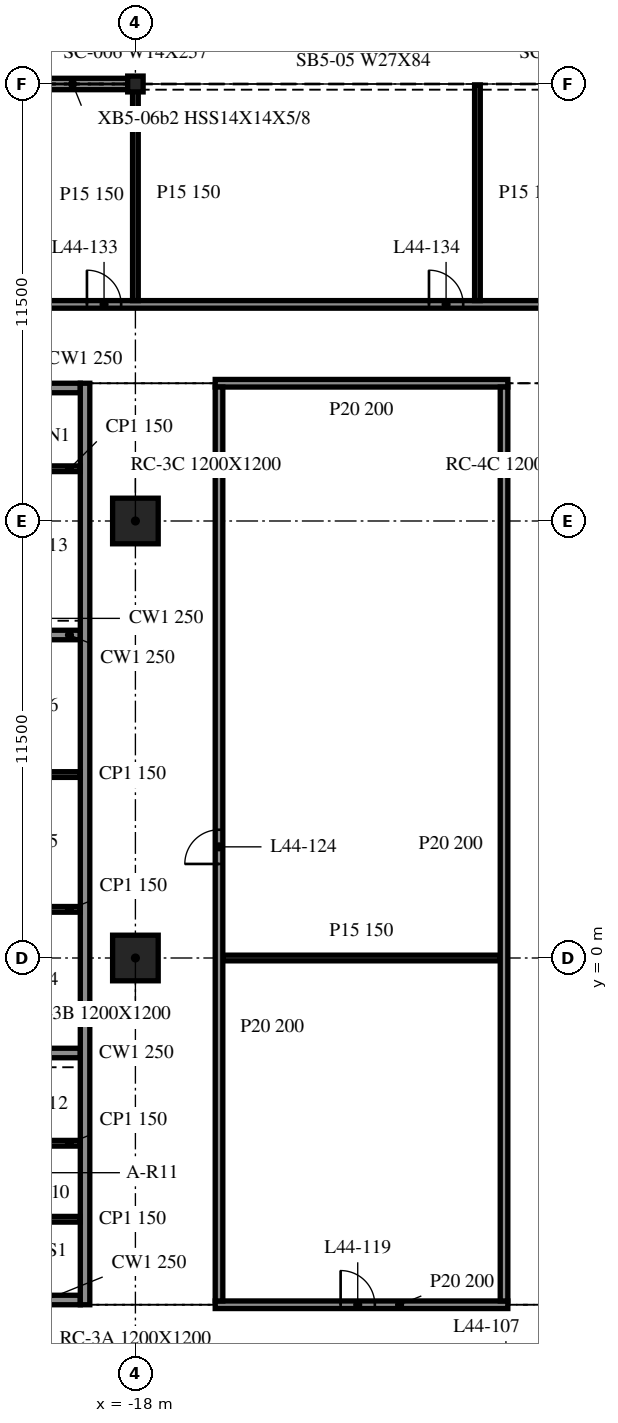
"""IFC4 building model, lengths in metres.
Left out: names, types, materials, properties, quantities, classifications, styles, units other than length and angle.
Written with IfcOpenShell. Run it as: python <this file> out.ifc"""

import sys

from ifc_helpers import new_model, si_unit, direction, frame, frame_2d, origin, origin_2d, place, context, subcontext, project, spatial, rectangle, i_section, extrude, element, fill, save


model = new_model("IFC4")
c1 = context("Model", 3, precision=1e-05, world=origin(), true_north=direction((0.0, 1.0)))
c2 = subcontext(c1, "Body", "Model", "MODEL_VIEW")
j1 = project(units=[si_unit("LENGTHUNIT", "METRE"), si_unit("PLANEANGLEUNIT", "RADIAN")], contexts=[c1])
p1 = place(None, origin())
s1 = spatial("IfcSite", under=j1, at=p1, CompositionType="ELEMENT")
p2 = place(p1, origin())
s2 = spatial("IfcBuilding", under=s1, at=p2, CompositionType="ELEMENT")
p3 = place(p2, frame((0.0, 0.0, 185.8)))
s3 = spatial("IfcBuildingStorey", under=s2, at=p3, CompositionType="ELEMENT", Elevation=185.8)
for number, where, z_axis, x_axis in (
    (1, (-18.0, 0.0, -0.34), (0.0, 0.0, 1.0), (1.0, 0.0, 0.0)),
    (2, (-18.0, 11.5, -0.34), (0.0, 0.0, 1.0), (1.0, 0.0, 0.0)),
):
    element("IfcColumn", number, at=place(p3, frame(where, z_axis=z_axis, x_axis=x_axis)), inside=s3, PredefinedType="COLUMN", context=c2, shape_type="SweptSolid", body=[
        extrude(rectangle(XDim=1.2, YDim=1.2, at=origin_2d()), origin(), (0.0, 0.0, 1.0), 3.74),
    ])
p4 = place(p3, frame((-18.0, 23.0, -0.34), z_axis=(0.0, 0.0, 1.0), x_axis=(1.0, 0.0, 0.0)))
e3 = element("IfcColumn", 3, at=p4, inside=s3, PredefinedType="COLUMN", context=c2, shape_type="SweptSolid", body=[
    extrude(i_section(OverallWidth=0.406, OverallDepth=0.417, WebThickness=0.03, FlangeThickness=0.048, at=origin_2d()), origin(), (0.0, 0.0, 1.0), 3.74),
])
p5 = place(p3, frame((-18.015, 23.0, 0.0), z_axis=(0.0, 0.0, 1.0), x_axis=(-1.0, 0.0, 0.0)))
e4 = element("IfcWall", 4, at=p5, inside=s3, PredefinedType="NOTDEFINED", context=c2, shape_type="SweptSolid", body=[
    extrude(rectangle(XDim=11.97, YDim=0.3, at=frame_2d((5.985, 0.0))), origin(), (0.0, 0.0, 1.0), 3.4),
])
p6 = place(p3, frame((-19.325, -9.125, 0.0), z_axis=(0.0, 0.0, 1.0), x_axis=(0.0, 1.0, 0.0)))
e5 = element("IfcWall", 5, at=p6, inside=s3, PredefinedType="SOLIDWALL", context=c2, shape_type="SweptSolid", body=[
    extrude(rectangle(XDim=24.25, YDim=0.25, at=frame_2d((12.125, 0.0))), origin(), (0.0, 0.0, 1.0), 3.4),
])
p7 = place(p3, frame((-19.45, -9.0, 0.0), z_axis=(0.0, 0.0, 1.0), x_axis=(-1.0, 0.0, 0.0)))
e6 = element("IfcWall", 6, at=p7, inside=s3, PredefinedType="SOLIDWALL", context=c2, shape_type="SweptSolid", body=[
    extrude(rectangle(XDim=9.1, YDim=0.25, at=frame_2d((4.55, 0.0))), origin(), (0.0, 0.0, 1.0), 3.4),
])
p8 = place(p7, frame((3.65, 0.0, 0.0)))
e7 = element("IfcOpeningElement", 7, at=p8, cuts=e6, PredefinedType="OPENING", context=c2, shape_type="SweptSolid", body=[
    extrude(rectangle(XDim=1.8, YDim=2.1, at=frame_2d((0.9, 1.05))), frame((0.0, 0.135, 0.0), z_axis=(0.0, -1.0, 0.0), x_axis=(1.0, 0.0, 0.0)), (0.0, 0.0, 1.0), 0.27),
])
p9 = place(p3, frame((-28.55, 15.0, 0.0), z_axis=(0.0, 0.0, 1.0), x_axis=(1.0, 0.0, 0.0)))
e8 = element("IfcWall", 8, at=p9, inside=s3, PredefinedType="SOLIDWALL", context=c2, shape_type="SweptSolid", body=[
    extrude(rectangle(XDim=9.1, YDim=0.25, at=frame_2d((4.55, 0.0))), origin(), (0.0, 0.0, 1.0), 3.4),
])
p10 = place(p9, frame((3.65, 0.0, 0.0)))
e9 = element("IfcOpeningElement", 9, at=p10, cuts=e8, PredefinedType="OPENING", context=c2, shape_type="SweptSolid", body=[
    extrude(rectangle(XDim=1.8, YDim=2.1, at=frame_2d((0.9, 1.05))), frame((0.0, 0.135, 0.0), z_axis=(0.0, -1.0, 0.0), x_axis=(1.0, 0.0, 0.0)), (0.0, 0.0, 1.0), 0.27),
])
for number, where, z_axis, x_axis in (
    (10, (-22.3, -2.5, 0.0), (0.0, 0.0, 1.0), (1.0, 0.0, 0.0)),
    (11, (-22.3, 8.5, 0.0), (0.0, 0.0, 1.0), (1.0, 0.0, 0.0)),
):
    element("IfcWall", number, at=place(p3, frame(where, z_axis=z_axis, x_axis=x_axis)), inside=s3, PredefinedType="SOLIDWALL", context=c2, shape_type="SweptSolid", body=[
        extrude(rectangle(XDim=2.85, YDim=0.25, at=frame_2d((1.425, 0.0))), origin(), (0.0, 0.0, 1.0), 3.4),
    ])
for number, where, z_axis, x_axis in (
    (12, (-22.3, 1.28, 0.0), (0.0, 0.0, 1.0), (1.0, 0.0, 0.0)),
    (13, (-22.3, 4.827, 0.0), (0.0, 0.0, 1.0), (1.0, 0.0, 0.0)),
    (14, (-22.3, -6.875, 0.0), (0.0, 0.0, 1.0), (1.0, 0.0, 0.0)),
    (15, (-22.3, -4.875, 0.0), (0.0, 0.0, 1.0), (1.0, 0.0, 0.0)),
    (16, (-22.3, 12.875, 0.0), (0.0, 0.0, 1.0), (1.0, 0.0, 0.0)),
):
    element("IfcWall", number, at=place(p3, frame(where, z_axis=z_axis, x_axis=x_axis)), inside=s3, PredefinedType="PARTITIONING", context=c2, shape_type="SweptSolid", body=[
        extrude(rectangle(XDim=2.85, YDim=0.15, at=frame_2d((1.425, 0.0))), origin(), (0.0, 0.0, 1.0), 3.4),
    ])
p11 = place(p3, frame((-15.9, -9.125, 0.0), z_axis=(0.0, 0.0, 1.0), x_axis=(1.0, 0.0, 0.0)))
e17 = element("IfcWall", 17, at=p11, inside=s3, PredefinedType="PARTITIONING", context=c2, shape_type="SweptSolid", body=[
    extrude(rectangle(XDim=7.7, YDim=0.2, at=frame_2d((3.85, 0.0))), origin(), (0.0, 0.0, 1.0), 3.4),
])
p12 = place(p11, frame((3.3, 0.0, 0.0)))
e18 = element("IfcOpeningElement", 18, at=p12, cuts=e17, PredefinedType="OPENING", context=c2, shape_type="SweptSolid", body=[
    extrude(rectangle(XDim=0.9, YDim=2.1, at=frame_2d((0.45, 1.05))), frame((0.0, 0.11, 0.0), z_axis=(0.0, -1.0, 0.0), x_axis=(1.0, 0.0, 0.0)), (0.0, 0.0, 1.0), 0.22),
])
p13 = place(p3, frame((-15.7, 0.0, 0.0), z_axis=(0.0, 0.0, 1.0), x_axis=(1.0, 0.0, 0.0)))
e19 = element("IfcWall", 19, at=p13, inside=s3, PredefinedType="PARTITIONING", context=c2, shape_type="SweptSolid", body=[
    extrude(rectangle(XDim=7.3, YDim=0.15, at=frame_2d((3.65, 0.0))), origin(), (0.0, 0.0, 1.0), 3.4),
])
p14 = place(p3, frame((-15.9, 15.125, 0.0), z_axis=(0.0, 0.0, 1.0), x_axis=(1.0, 0.0, 0.0)))
e20 = element("IfcWall", 20, at=p14, inside=s3, PredefinedType="PARTITIONING", context=c2, shape_type="SweptSolid", body=[
    extrude(rectangle(XDim=7.7, YDim=0.2, at=frame_2d((3.85, 0.0))), origin(), (0.0, 0.0, 1.0), 3.4),
])
p15 = place(p3, frame((-47.975, 17.2, 0.0), z_axis=(0.0, 0.0, 1.0), x_axis=(1.0, 0.0, 0.0)))
e21 = element("IfcWall", 21, at=p15, inside=s3, PredefinedType="PARTITIONING", context=c2, shape_type="SweptSolid", body=[
    extrude(rectangle(XDim=95.95, YDim=0.2, at=frame_2d((47.975, 0.0))), origin(), (0.0, 0.0, 1.0), 3.4),
])
p16 = place(p15, frame((7.7, 0.0, 0.0)))
e22 = element("IfcOpeningElement", 22, at=p16, cuts=e21, PredefinedType="OPENING", context=c2, shape_type="SweptSolid", body=[
    extrude(rectangle(XDim=0.9, YDim=2.1, at=frame_2d((0.45, 1.05))), frame((0.0, 0.11, 0.0), z_axis=(0.0, -1.0, 0.0), x_axis=(1.0, 0.0, 0.0)), (0.0, 0.0, 1.0), 0.22),
])
p17 = place(p15, frame((16.7, 0.0, 0.0)))
e23 = element("IfcOpeningElement", 23, at=p17, cuts=e21, PredefinedType="OPENING", context=c2, shape_type="SweptSolid", body=[
    extrude(rectangle(XDim=0.9, YDim=2.1, at=frame_2d((0.45, 1.05))), frame((0.0, 0.11, 0.0), z_axis=(0.0, -1.0, 0.0), x_axis=(1.0, 0.0, 0.0)), (0.0, 0.0, 1.0), 0.22),
])
p18 = place(p15, frame((22.7, 0.0, 0.0)))
e24 = element("IfcOpeningElement", 24, at=p18, cuts=e21, PredefinedType="OPENING", context=c2, shape_type="SweptSolid", body=[
    extrude(rectangle(XDim=0.9, YDim=2.1, at=frame_2d((0.45, 1.05))), frame((0.0, 0.11, 0.0), z_axis=(0.0, -1.0, 0.0), x_axis=(1.0, 0.0, 0.0)), (0.0, 0.0, 1.0), 0.22),
])
p19 = place(p15, frame((26.1, 0.0, 0.0)))
e25 = element("IfcOpeningElement", 25, at=p19, cuts=e21, PredefinedType="OPENING", context=c2, shape_type="SweptSolid", body=[
    extrude(rectangle(XDim=0.9, YDim=2.1, at=frame_2d((0.45, 1.05))), frame((0.0, 0.11, 0.0), z_axis=(0.0, -1.0, 0.0), x_axis=(1.0, 0.0, 0.0)), (0.0, 0.0, 1.0), 0.22),
])
p20 = place(p15, frame((28.7, 0.0, 0.0)))
e26 = element("IfcOpeningElement", 26, at=p20, cuts=e21, PredefinedType="OPENING", context=c2, shape_type="SweptSolid", body=[
    extrude(rectangle(XDim=0.9, YDim=2.1, at=frame_2d((0.45, 1.05))), frame((0.0, 0.11, 0.0), z_axis=(0.0, -1.0, 0.0), x_axis=(1.0, 0.0, 0.0)), (0.0, 0.0, 1.0), 0.22),
])
p21 = place(p15, frame((37.7, 0.0, 0.0)))
e27 = element("IfcOpeningElement", 27, at=p21, cuts=e21, PredefinedType="OPENING", context=c2, shape_type="SweptSolid", body=[
    extrude(rectangle(XDim=0.9, YDim=2.1, at=frame_2d((0.45, 1.05))), frame((0.0, 0.11, 0.0), z_axis=(0.0, -1.0, 0.0), x_axis=(1.0, 0.0, 0.0)), (0.0, 0.0, 1.0), 0.22),
])
p22 = place(p15, frame((46.7, 0.0, 0.0)))
e28 = element("IfcOpeningElement", 28, at=p22, cuts=e21, PredefinedType="OPENING", context=c2, shape_type="SweptSolid", body=[
    extrude(rectangle(XDim=0.9, YDim=2.1, at=frame_2d((0.45, 1.05))), frame((0.0, 0.11, 0.0), z_axis=(0.0, -1.0, 0.0), x_axis=(1.0, 0.0, 0.0)), (0.0, 0.0, 1.0), 0.22),
])
p23 = place(p15, frame((48.1, 0.0, 0.0)))
e29 = element("IfcOpeningElement", 29, at=p23, cuts=e21, PredefinedType="OPENING", context=c2, shape_type="SweptSolid", body=[
    extrude(rectangle(XDim=0.9, YDim=2.1, at=frame_2d((0.45, 1.05))), frame((0.0, 0.11, 0.0), z_axis=(0.0, -1.0, 0.0), x_axis=(1.0, 0.0, 0.0)), (0.0, 0.0, 1.0), 0.22),
])
p24 = place(p15, frame((54.1, 0.0, 0.0)))
e30 = element("IfcOpeningElement", 30, at=p24, cuts=e21, PredefinedType="OPENING", context=c2, shape_type="SweptSolid", body=[
    extrude(rectangle(XDim=0.9, YDim=2.1, at=frame_2d((0.45, 1.05))), frame((0.0, 0.11, 0.0), z_axis=(0.0, -1.0, 0.0), x_axis=(1.0, 0.0, 0.0)), (0.0, 0.0, 1.0), 0.22),
])
p25 = place(p15, frame((57.5, 0.0, 0.0)))
e31 = element("IfcOpeningElement", 31, at=p25, cuts=e21, PredefinedType="OPENING", context=c2, shape_type="SweptSolid", body=[
    extrude(rectangle(XDim=0.9, YDim=2.1, at=frame_2d((0.45, 1.05))), frame((0.0, 0.11, 0.0), z_axis=(0.0, -1.0, 0.0), x_axis=(1.0, 0.0, 0.0)), (0.0, 0.0, 1.0), 0.22),
])
p26 = place(p15, frame((60.1, 0.0, 0.0)))
e32 = element("IfcOpeningElement", 32, at=p26, cuts=e21, PredefinedType="OPENING", context=c2, shape_type="SweptSolid", body=[
    extrude(rectangle(XDim=0.9, YDim=2.1, at=frame_2d((0.45, 1.05))), frame((0.0, 0.11, 0.0), z_axis=(0.0, -1.0, 0.0), x_axis=(1.0, 0.0, 0.0)), (0.0, 0.0, 1.0), 0.22),
])
p27 = place(p15, frame((69.1, 0.0, 0.0)))
e33 = element("IfcOpeningElement", 33, at=p27, cuts=e21, PredefinedType="OPENING", context=c2, shape_type="SweptSolid", body=[
    extrude(rectangle(XDim=0.9, YDim=2.1, at=frame_2d((0.45, 1.05))), frame((0.0, 0.11, 0.0), z_axis=(0.0, -1.0, 0.0), x_axis=(1.0, 0.0, 0.0)), (0.0, 0.0, 1.0), 0.22),
])
p28 = place(p15, frame((78.1, 0.0, 0.0)))
e34 = element("IfcOpeningElement", 34, at=p28, cuts=e21, PredefinedType="OPENING", context=c2, shape_type="SweptSolid", body=[
    extrude(rectangle(XDim=0.9, YDim=2.1, at=frame_2d((0.45, 1.05))), frame((0.0, 0.11, 0.0), z_axis=(0.0, -1.0, 0.0), x_axis=(1.0, 0.0, 0.0)), (0.0, 0.0, 1.0), 0.22),
])
p29 = place(p15, frame((84.1, 0.0, 0.0)))
e35 = element("IfcOpeningElement", 35, at=p29, cuts=e21, PredefinedType="OPENING", context=c2, shape_type="SweptSolid", body=[
    extrude(rectangle(XDim=0.9, YDim=2.1, at=frame_2d((0.45, 1.05))), frame((0.0, 0.11, 0.0), z_axis=(0.0, -1.0, 0.0), x_axis=(1.0, 0.0, 0.0)), (0.0, 0.0, 1.0), 0.22),
])
p30 = place(p15, frame((87.5, 0.0, 0.0)))
e36 = element("IfcOpeningElement", 36, at=p30, cuts=e21, PredefinedType="OPENING", context=c2, shape_type="SweptSolid", body=[
    extrude(rectangle(XDim=0.9, YDim=2.1, at=frame_2d((0.45, 1.05))), frame((0.0, 0.11, 0.0), z_axis=(0.0, -1.0, 0.0), x_axis=(1.0, 0.0, 0.0)), (0.0, 0.0, 1.0), 0.22),
])
p31 = place(p15, frame((90.1, 0.0, 0.0)))
e37 = element("IfcOpeningElement", 37, at=p31, cuts=e21, PredefinedType="OPENING", context=c2, shape_type="SweptSolid", body=[
    extrude(rectangle(XDim=0.9, YDim=2.1, at=frame_2d((0.45, 1.05))), frame((0.0, 0.11, 0.0), z_axis=(0.0, -1.0, 0.0), x_axis=(1.0, 0.0, 0.0)), (0.0, 0.0, 1.0), 0.22),
])
p32 = place(p3, frame((-18.0, 17.3, 0.0), z_axis=(0.0, 0.0, 1.0), x_axis=(0.0, 1.0, 0.0)))
e38 = element("IfcWall", 38, at=p32, inside=s3, PredefinedType="PARTITIONING", context=c2, shape_type="SweptSolid", body=[
    extrude(rectangle(XDim=5.675, YDim=0.15, at=frame_2d((2.837, 0.0))), origin(), (0.0, 0.0, 1.0), 3.4),
])
p33 = place(p3, frame((-15.8, -9.025, 0.0), z_axis=(0.0, 0.0, 1.0), x_axis=(0.0, 1.0, 0.0)))
e39 = element("IfcWall", 39, at=p33, inside=s3, PredefinedType="PARTITIONING", context=c2, shape_type="SweptSolid", body=[
    extrude(rectangle(XDim=24.05, YDim=0.2, at=frame_2d((12.025, 0.0))), origin(), (0.0, 0.0, 1.0), 3.4),
])
p34 = place(p33, frame((11.5, 0.0, 0.0)))
e40 = element("IfcOpeningElement", 40, at=p34, cuts=e39, PredefinedType="OPENING", context=c2, shape_type="SweptSolid", body=[
    extrude(rectangle(XDim=0.9, YDim=2.1, at=frame_2d((0.45, 1.05))), frame((0.0, 0.11, 0.0), z_axis=(0.0, -1.0, 0.0), x_axis=(1.0, 0.0, 0.0)), (0.0, 0.0, 1.0), 0.22),
])
p35 = place(p3, frame((-9.0, 17.3, 0.0), z_axis=(0.0, 0.0, 1.0), x_axis=(0.0, 1.0, 0.0)))
e41 = element("IfcWall", 41, at=p35, inside=s3, PredefinedType="PARTITIONING", context=c2, shape_type="SweptSolid", body=[
    extrude(rectangle(XDim=5.675, YDim=0.15, at=frame_2d((2.837, 0.0))), origin(), (0.0, 0.0, 1.0), 3.4),
])
p36 = place(p3, frame((-8.3, -9.025, 0.0), z_axis=(0.0, 0.0, 1.0), x_axis=(0.0, 1.0, 0.0)))
e42 = element("IfcWall", 42, at=p36, inside=s3, PredefinedType="PARTITIONING", context=c2, shape_type="SweptSolid", body=[
    extrude(rectangle(XDim=24.05, YDim=0.2, at=frame_2d((12.025, 0.0))), origin(), (0.0, 0.0, 1.0), 3.4),
])
p37 = place(p12, origin())
e43 = element("IfcDoor", 43, at=p37, inside=s3, OperationType="SINGLE_SWING_LEFT", PredefinedType="DOOR", context=c2, shape_type="SweptSolid", body=[
    extrude(rectangle(XDim=0.9, YDim=2.1, at=frame_2d((0.45, 1.05))), frame((0.0, 0.025, 0.0), z_axis=(0.0, -1.0, 0.0), x_axis=(1.0, 0.0, 0.0)), (0.0, 0.0, 1.0), 0.05),
])
fill(e18, e43)
p38 = place(p34, origin())
e44 = element("IfcDoor", 44, at=p38, inside=s3, OperationType="SINGLE_SWING_RIGHT", PredefinedType="DOOR", context=c2, shape_type="SweptSolid", body=[
    extrude(rectangle(XDim=0.9, YDim=2.1, at=frame_2d((0.45, 1.05))), frame((0.0, 0.025, 0.0), z_axis=(0.0, -1.0, 0.0), x_axis=(1.0, 0.0, 0.0)), (0.0, 0.0, 1.0), 0.05),
])
fill(e40, e44)
p39 = place(p20, origin())
e45 = element("IfcDoor", 45, at=p39, inside=s3, OperationType="SINGLE_SWING_LEFT", PredefinedType="DOOR", context=c2, shape_type="SweptSolid", body=[
    extrude(rectangle(XDim=0.9, YDim=2.1, at=frame_2d((0.45, 1.05))), frame((0.0, 0.025, 0.0), z_axis=(0.0, -1.0, 0.0), x_axis=(1.0, 0.0, 0.0)), (0.0, 0.0, 1.0), 0.05),
])
fill(e26, e45)
p40 = place(p21, origin())
e46 = element("IfcDoor", 46, at=p40, inside=s3, OperationType="SINGLE_SWING_LEFT", PredefinedType="DOOR", context=c2, shape_type="SweptSolid", body=[
    extrude(rectangle(XDim=0.9, YDim=2.1, at=frame_2d((0.45, 1.05))), frame((0.0, 0.025, 0.0), z_axis=(0.0, -1.0, 0.0), x_axis=(1.0, 0.0, 0.0)), (0.0, 0.0, 1.0), 0.05),
])
fill(e27, e46)
save(model, sys.argv[1])
